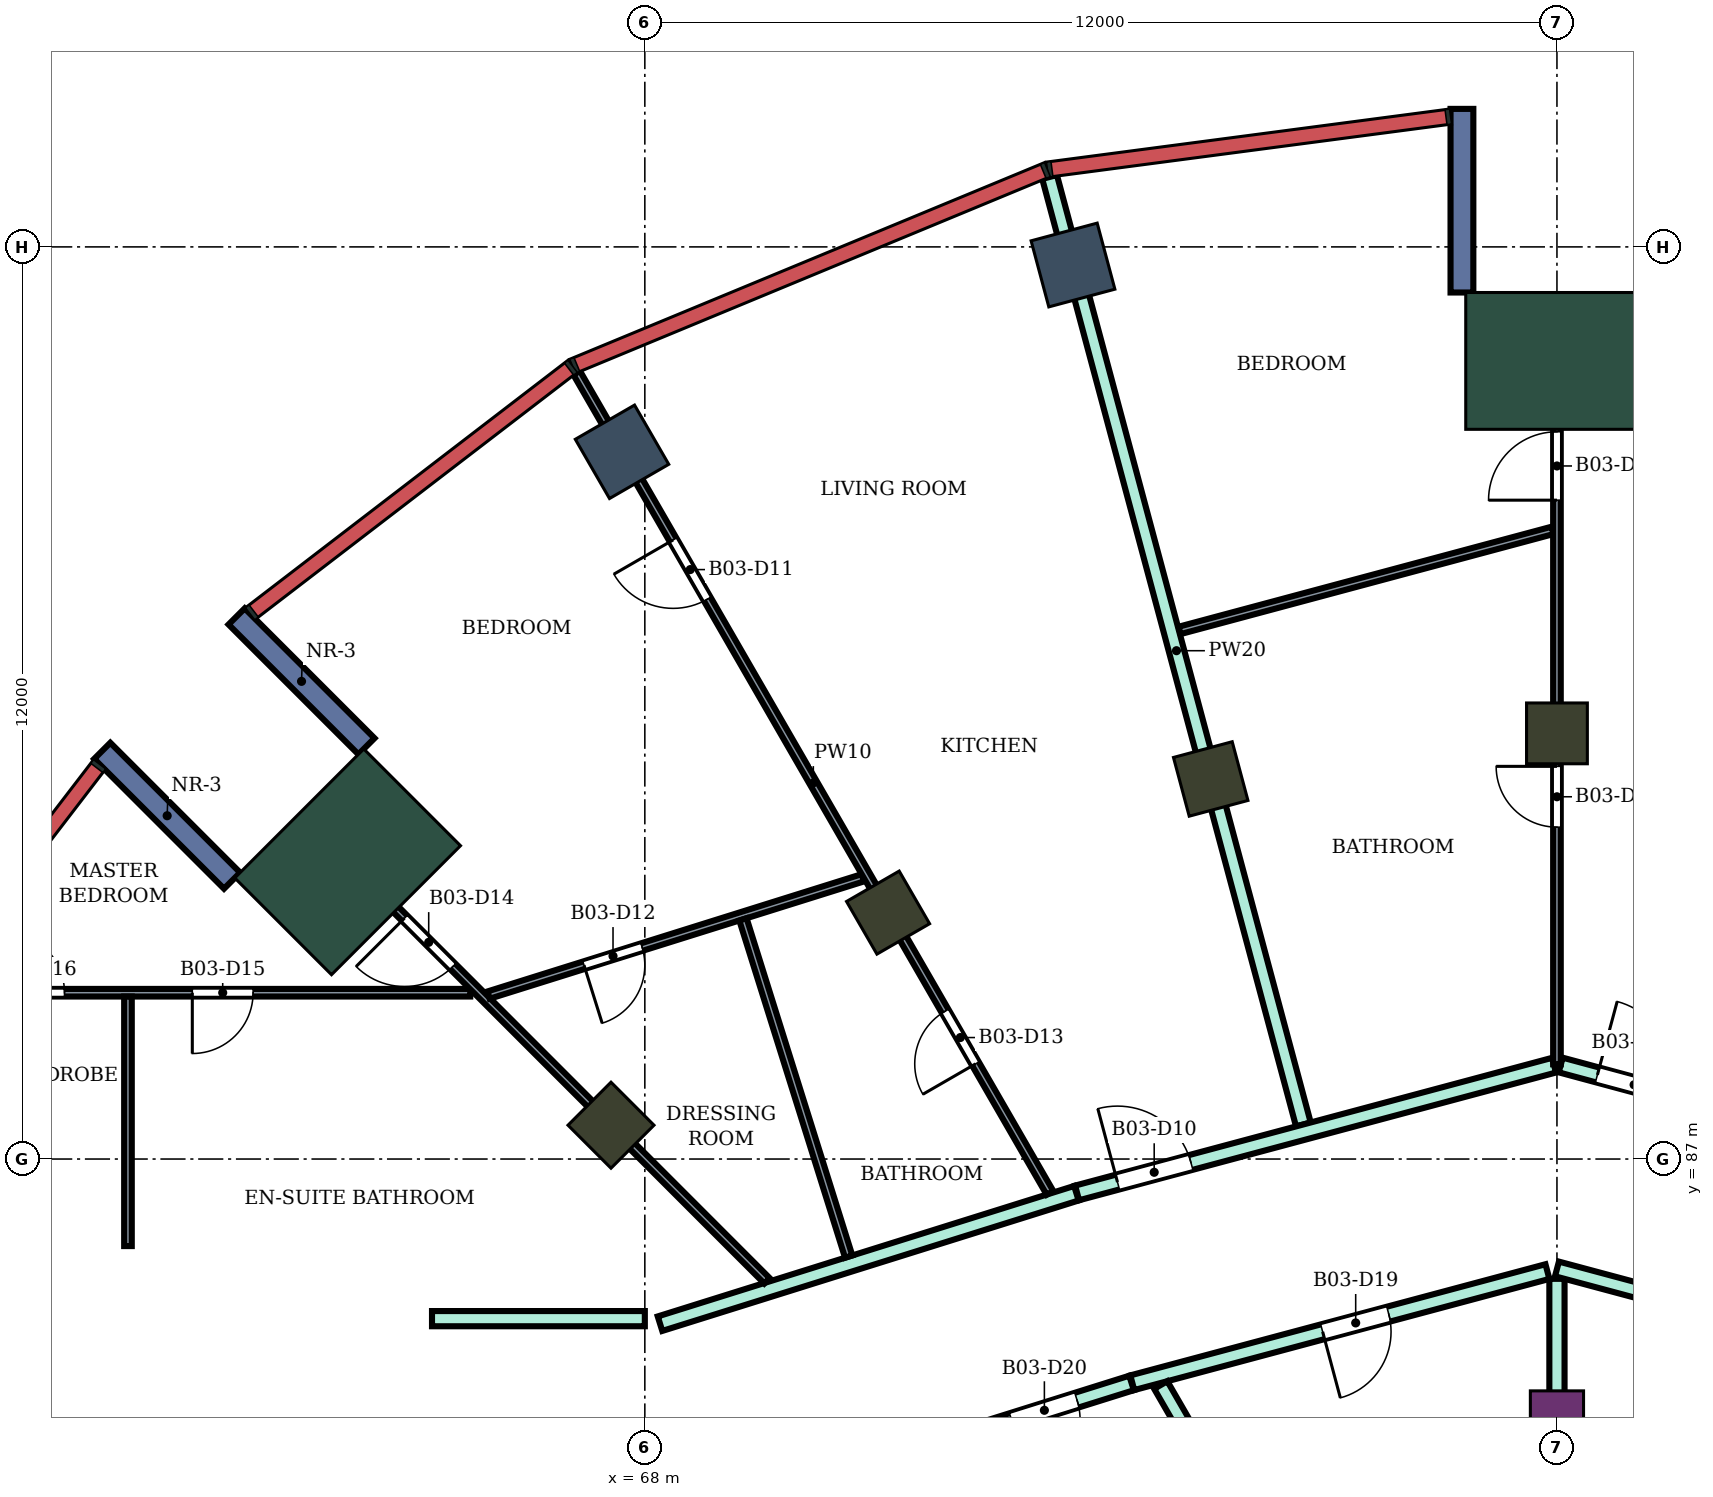
"""IFC4 building model, lengths in metres.
Left out: names, types, materials, properties, quantities, classifications, styles, units other than length and angle.
Written with IfcOpenShell. Run it as: python <this file> out.ifc"""

import sys

from ifc_helpers import new_model, si_unit, direction, frame, frame_2d, origin, origin_2d, place, context, subcontext, project, spatial, rectangle, extrude, element, fill, save


model = new_model("IFC4")
c1 = context("Model", 3, precision=1e-05, world=origin(), true_north=direction((0.0, 1.0)))
c2 = subcontext(c1, "Body", "Model", "MODEL_VIEW")
j1 = project(units=[si_unit("LENGTHUNIT", "METRE"), si_unit("PLANEANGLEUNIT", "RADIAN")], contexts=[c1])
p1 = place(None, origin())
s1 = spatial("IfcSite", under=j1, at=p1, CompositionType="ELEMENT")
p2 = place(p1, origin())
s2 = spatial("IfcBuilding", under=s1, at=p2, CompositionType="ELEMENT")
p3 = place(p2, frame((0.0, 0.0, 237.3)))
s3 = spatial("IfcBuildingStorey", under=s2, at=p3, CompositionType="ELEMENT", Elevation=237.3)
for number, where, z_axis, x_axis in (
    (1, (73.633, 98.762, 0.0), (0.0, 0.0, 1.0), (-0.259, 0.966, 0.0)),
    (2, (67.7, 96.304, 0.0), (0.0, 0.0, 1.0), (-0.5, 0.866, 0.0)),
):
    element("IfcColumn", number, at=place(p3, frame(where, z_axis=z_axis, x_axis=x_axis)), inside=s3, PredefinedType="COLUMN", context=c2, shape_type="SweptSolid", body=[
        extrude(rectangle(XDim=0.9, YDim=0.9, at=origin_2d()), origin(), (0.0, 0.0, 1.0), 4.2),
    ])
for number, where, z_axis, x_axis in (
    (3, (80.0, 92.6, 0.0), (0.0, 0.0, 1.0), (0.0, 1.0, 0.0)),
    (4, (75.445, 92.0, 0.0), (0.0, 0.0, 1.0), (-0.259, 0.966, 0.0)),
    (5, (71.2, 90.242, 0.0), (0.0, 0.0, 1.0), (-0.5, 0.866, 0.0)),
    (6, (67.555, 87.445, 0.0), (0.0, 0.0, 1.0), (-0.707, 0.707, 0.0)),
):
    element("IfcColumn", number, at=place(p3, frame(where, z_axis=z_axis, x_axis=x_axis)), inside=s3, PredefinedType="COLUMN", context=c2, shape_type="SweptSolid", body=[
        extrude(rectangle(XDim=0.8, YDim=0.8, at=origin_2d()), origin(), (0.0, 0.0, 1.0), 4.2),
    ])
p4 = place(p3, frame((80.0, 83.6, 0.0), z_axis=(0.0, 0.0, 1.0), x_axis=(0.0, 1.0, 0.0)))
e7 = element("IfcColumn", 7, at=p4, inside=s3, PredefinedType="COLUMN", context=c2, shape_type="SweptSolid", body=[
    extrude(rectangle(XDim=0.7, YDim=0.7, at=origin_2d()), origin(), (0.0, 0.0, 1.0), 4.2),
])
for number, where, z_axis, x_axis in (
    (8, (80.0, 97.5, 0.0), (0.0, 0.0, 1.0), (0.0, 1.0, 0.0)),
    (9, (64.09, 90.91, 0.0), (0.0, 0.0, 1.0), (-0.707, 0.707, 0.0)),
):
    element("IfcColumn", number, at=place(p3, frame(where, z_axis=z_axis, x_axis=x_axis)), inside=s3, PredefinedType="COLUMN", context=c2, shape_type="SweptSolid", body=[
        extrude(rectangle(XDim=1.8, YDim=2.4, at=origin_2d()), origin(), (0.0, 0.0, 1.0), 4.2),
    ])
for number, where, z_axis, x_axis in (
    (10, (78.75, 98.4, 0.0), (0.0, 0.0, 1.0), (0.0, 1.0, 0.0)),
    (11, (64.338, 92.43, 0.0), (0.0, 0.0, 1.0), (-0.707, 0.707, 0.0)),
    (12, (62.57, 90.662, 0.0), (0.0, 0.0, 1.0), (-0.707, 0.707, 0.0)),
):
    element("IfcWall", number, at=place(p3, frame(where, z_axis=z_axis, x_axis=x_axis)), inside=s3, PredefinedType="NOTDEFINED", context=c2, shape_type="SweptSolid", body=[
        extrude(rectangle(XDim=2.416, YDim=0.3, at=frame_2d((1.208, 0.0))), origin(), (0.0, 0.0, 1.0), 4.2),
    ])
p5 = place(p3, frame((65.2, 84.9, 0.0), z_axis=(0.0, 0.0, 1.0), x_axis=(1.0, 0.0, 0.0)))
e13 = element("IfcWall", 13, at=p5, inside=s3, PredefinedType="PARTITIONING", context=c2, shape_type="SweptSolid", body=[
    extrude(rectangle(XDim=2.8, YDim=0.2, at=frame_2d((1.4, 0.0))), origin(), (0.0, 0.0, 1.0), 3.75),
])
p6 = place(p3, frame((68.2, 84.834, 0.0), z_axis=(0.0, 0.0, 1.0), x_axis=(0.954272398161, 0.298938438661, 0.0)))
e14 = element("IfcWall", 14, at=p6, inside=s3, PredefinedType="PARTITIONING", context=c2, shape_type="SweptSolid", body=[
    extrude(rectangle(XDim=5.74, YDim=0.2, at=frame_2d((2.87, 0.0))), origin(), (0.0, 0.0, 1.0), 3.75),
])
p7 = place(p3, frame((72.1, 83.332, 0.0), z_axis=(0.0, 0.0, 1.0), x_axis=(0.954233106619, 0.299063836383, 0.0)))
e15 = element("IfcWall", 15, at=p7, inside=s3, PredefinedType="PARTITIONING", context=c2, shape_type="SweptSolid", body=[
    extrude(rectangle(XDim=2.414, YDim=0.2, at=frame_2d((1.207, 0.0))), origin(), (0.0, 0.0, 1.0), 3.75),
])
p8 = place(p7, frame((0.762, 0.0, 0.0)))
e16 = element("IfcOpeningElement", 16, at=p8, cuts=e15, PredefinedType="OPENING", context=c2, shape_type="SweptSolid", body=[
    extrude(rectangle(XDim=0.9, YDim=2.1, at=frame_2d((0.45, 1.05))), frame((0.0, 0.11, 0.0), z_axis=(0.0, -1.0, 0.0), x_axis=(1.0, 0.0, 0.0)), (0.0, 0.0, 1.0), 0.22),
])
p9 = place(p3, frame((73.325, 99.92, 0.0), z_axis=(0.0, 0.0, 1.0), x_axis=(0.258745857482, -0.965945433881, 0.0)))
e17 = element("IfcWall", 17, at=p9, inside=s3, PredefinedType="PARTITIONING", context=c2, shape_type="SweptSolid", body=[
    extrude(rectangle(XDim=12.904, YDim=0.2, at=frame_2d((6.452, 0.0))), origin(), (0.0, 0.0, 1.0), 3.75),
])
p10 = place(p3, frame((73.687, 86.554, 0.0), z_axis=(0.0, 0.0, 1.0), x_axis=(0.96595928904, 0.258694128106, 0.0)))
e18 = element("IfcWall", 18, at=p10, inside=s3, PredefinedType="PARTITIONING", context=c2, shape_type="SweptSolid", body=[
    extrude(rectangle(XDim=6.496, YDim=0.2, at=frame_2d((3.248, 0.0))), origin(), (0.0, 0.0, 1.0), 3.75),
])
p11 = place(p10, frame((0.55, 0.0, 0.0)))
e19 = element("IfcOpeningElement", 19, at=p11, cuts=e18, PredefinedType="OPENING", context=c2, shape_type="SweptSolid", body=[
    extrude(rectangle(XDim=1.0, YDim=2.1, at=frame_2d((0.5, 1.05))), frame((0.0, 0.11, 0.0), z_axis=(0.0, -1.0, 0.0), x_axis=(1.0, 0.0, 0.0)), (0.0, 0.0, 1.0), 0.22),
])
p12 = place(p3, frame((74.413, 84.057, 0.0), z_axis=(0.0, 0.0, 1.0), x_axis=(0.965972135939, 0.258646153246, 0.0)))
e20 = element("IfcWall", 20, at=p12, inside=s3, PredefinedType="PARTITIONING", context=c2, shape_type="SweptSolid", body=[
    extrude(rectangle(XDim=5.654, YDim=0.2, at=frame_2d((2.827, 0.0))), origin(), (0.0, 0.0, 1.0), 3.75),
])
p13 = place(p12, frame((2.593, 0.0, 0.0)))
e21 = element("IfcOpeningElement", 21, at=p13, cuts=e20, PredefinedType="OPENING", context=c2, shape_type="SweptSolid", body=[
    extrude(rectangle(XDim=0.9, YDim=2.1, at=frame_2d((0.45, 1.05))), frame((0.0, 0.11, 0.0), z_axis=(0.0, -1.0, 0.0), x_axis=(1.0, 0.0, 0.0)), (0.0, 0.0, 1.0), 0.22),
])
p14 = place(p3, frame((74.787, 84.027, 0.0), z_axis=(0.0, 0.0, 1.0), x_axis=(0.500079107518, -0.86597972622, 0.0)))
e22 = element("IfcWall", 22, at=p14, inside=s3, PredefinedType="PARTITIONING", context=c2, shape_type="SweptSolid", body=[
    extrude(rectangle(XDim=2.726, YDim=0.2, at=frame_2d((1.363, 0.0))), origin(), (0.0, 0.0, 1.0), 3.75),
])
p15 = place(p3, frame((80.0, 82.699, 0.0), z_axis=(0.0, 0.0, 1.0), x_axis=(0.0, 1.0, 0.0)))
e23 = element("IfcWall", 23, at=p15, inside=s3, PredefinedType="PARTITIONING", context=c2, shape_type="SweptSolid", body=[
    extrude(rectangle(XDim=2.725, YDim=0.2, at=frame_2d((1.363, 0.0))), origin(), (0.0, 0.0, 1.0), 3.75),
])
p16 = place(p3, frame((80.0, 85.554, 0.0), z_axis=(0.0, 0.0, 1.0), x_axis=(0.965928989968, -0.258807237802, 0.0)))
e24 = element("IfcWall", 24, at=p16, inside=s3, PredefinedType="PARTITIONING", context=c2, shape_type="SweptSolid", body=[
    extrude(rectangle(XDim=5.774, YDim=0.2, at=frame_2d((2.887, 0.0))), origin(), (0.0, 0.0, 1.0), 3.75),
])
p17 = place(p16, frame((2.292, 0.0, 0.0)))
e25 = element("IfcOpeningElement", 25, at=p17, cuts=e24, PredefinedType="OPENING", context=c2, shape_type="SweptSolid", body=[
    extrude(rectangle(XDim=0.9, YDim=2.1, at=frame_2d((0.45, 1.05))), frame((0.0, 0.11, 0.0), z_axis=(0.0, -1.0, 0.0), x_axis=(1.0, 0.0, 0.0)), (0.0, 0.0, 1.0), 0.22),
])
p18 = place(p3, frame((80.049, 88.237, 0.0), z_axis=(0.0, 0.0, 1.0), x_axis=(0.965582990495, -0.260095152718, 0.0)))
e26 = element("IfcWall", 26, at=p18, inside=s3, PredefinedType="PARTITIONING", context=c2, shape_type="SweptSolid", body=[
    extrude(rectangle(XDim=6.476, YDim=0.2, at=frame_2d((3.238, 0.0))), origin(), (0.0, 0.0, 1.0), 3.75),
])
p19 = place(p18, frame((0.5, 0.0, 0.0)))
e27 = element("IfcOpeningElement", 27, at=p19, cuts=e26, PredefinedType="OPENING", context=c2, shape_type="SweptSolid", body=[
    extrude(rectangle(XDim=1.0, YDim=2.1, at=frame_2d((0.5, 1.05))), frame((0.0, 0.11, 0.0), z_axis=(0.0, -1.0, 0.0), x_axis=(1.0, 0.0, 0.0)), (0.0, 0.0, 1.0), 0.22),
])
p20 = place(p3, frame((58.6, 89.188, 0.0), z_axis=(0.0, 0.0, 1.0), x_axis=(1.0, 0.0, 0.0)))
e28 = element("IfcWall", 28, at=p20, inside=s3, PredefinedType="PARTITIONING", context=c2, shape_type="SweptSolid", body=[
    extrude(rectangle(XDim=7.103, YDim=0.1, at=frame_2d((3.551, 0.0))), origin(), (0.0, 0.0, 1.0), 3.75),
])
p21 = place(p20, frame((3.447, 0.0, 0.0)))
e29 = element("IfcOpeningElement", 29, at=p21, cuts=e28, PredefinedType="OPENING", context=c2, shape_type="SweptSolid", body=[
    extrude(rectangle(XDim=0.8, YDim=2.1, at=frame_2d((0.4, 1.05))), frame((0.0, 0.06, 0.0), z_axis=(0.0, -1.0, 0.0), x_axis=(1.0, 0.0, 0.0)), (0.0, 0.0, 1.0), 0.12),
])
p22 = place(p20, frame((0.965, 0.0, 0.0)))
e30 = element("IfcOpeningElement", 30, at=p22, cuts=e28, PredefinedType="OPENING", context=c2, shape_type="SweptSolid", body=[
    extrude(rectangle(XDim=0.8, YDim=2.1, at=frame_2d((0.4, 1.05))), frame((0.0, 0.06, 0.0), z_axis=(0.0, -1.0, 0.0), x_axis=(1.0, 0.0, 0.0)), (0.0, 0.0, 1.0), 0.12),
])
p23 = place(p3, frame((61.2, 85.855, 0.0), z_axis=(0.0, 0.0, 1.0), x_axis=(0.0, 1.0, 0.0)))
e31 = element("IfcWall", 31, at=p23, inside=s3, PredefinedType="PARTITIONING", context=c2, shape_type="SweptSolid", body=[
    extrude(rectangle(XDim=3.283, YDim=0.1, at=frame_2d((1.642, 0.0))), origin(), (0.0, 0.0, 1.0), 3.75),
])
p24 = place(p3, frame((63.599, 91.409, 0.0), z_axis=(0.0, 0.0, 1.0), x_axis=(0.706948776529, -0.707264750546, 0.0)))
e32 = element("IfcWall", 32, at=p24, inside=s3, PredefinedType="PARTITIONING", context=c2, shape_type="SweptSolid", body=[
    extrude(rectangle(XDim=8.499, YDim=0.1, at=frame_2d((4.25, 0.0))), origin(), (0.0, 0.0, 1.0), 3.75),
])
p25 = place(p24, frame((1.753, 0.0, 0.0)))
e33 = element("IfcOpeningElement", 33, at=p25, cuts=e32, PredefinedType="OPENING", context=c2, shape_type="SweptSolid", body=[
    extrude(rectangle(XDim=0.9, YDim=2.1, at=frame_2d((0.45, 1.05))), frame((0.0, 0.06, 0.0), z_axis=(0.0, -1.0, 0.0), x_axis=(1.0, 0.0, 0.0)), (0.0, 0.0, 1.0), 0.12),
])
p26 = place(p3, frame((65.944, 89.157, 0.0), z_axis=(0.0, 0.0, 1.0), x_axis=(0.954248987961, 0.299013158531, 0.0)))
e34 = element("IfcWall", 34, at=p26, inside=s3, PredefinedType="PARTITIONING", context=c2, shape_type="SweptSolid", body=[
    extrude(rectangle(XDim=5.159, YDim=0.1, at=frame_2d((2.58, 0.0))), origin(), (0.0, 0.0, 1.0), 3.75),
])
p27 = place(p26, frame((1.316, 0.0, 0.0)))
e35 = element("IfcOpeningElement", 35, at=p27, cuts=e34, PredefinedType="OPENING", context=c2, shape_type="SweptSolid", body=[
    extrude(rectangle(XDim=0.8, YDim=2.1, at=frame_2d((0.4, 1.05))), frame((0.0, 0.06, 0.0), z_axis=(0.0, -1.0, 0.0), x_axis=(1.0, 0.0, 0.0)), (0.0, 0.0, 1.0), 0.12),
])
p28 = place(p3, frame((67.104, 97.343, 0.0), z_axis=(0.0, 0.0, 1.0), x_axis=(0.499891560959, -0.866088002043, 0.0)))
e36 = element("IfcWall", 36, at=p28, inside=s3, PredefinedType="PARTITIONING", context=c2, shape_type="SweptSolid", body=[
    extrude(rectangle(XDim=12.456, YDim=0.1, at=frame_2d((6.228, 0.0))), origin(), (0.0, 0.0, 1.0), 3.75),
])
p29 = place(p28, frame((2.538, 0.0, 0.0)))
e37 = element("IfcOpeningElement", 37, at=p29, cuts=e36, PredefinedType="OPENING", context=c2, shape_type="SweptSolid", body=[
    extrude(rectangle(XDim=0.9, YDim=2.1, at=frame_2d((0.45, 1.05))), frame((0.0, 0.06, 0.0), z_axis=(0.0, -1.0, 0.0), x_axis=(1.0, 0.0, 0.0)), (0.0, 0.0, 1.0), 0.12),
])
p30 = place(p28, frame((9.697, 0.0, 0.0)))
e38 = element("IfcOpeningElement", 38, at=p30, cuts=e36, PredefinedType="OPENING", context=c2, shape_type="SweptSolid", body=[
    extrude(rectangle(XDim=0.8, YDim=2.1, at=frame_2d((0.4, 1.05))), frame((0.0, 0.06, 0.0), z_axis=(0.0, -1.0, 0.0), x_axis=(1.0, 0.0, 0.0)), (0.0, 0.0, 1.0), 0.12),
])
p31 = place(p3, frame((69.291, 90.153, 0.0), z_axis=(0.0, 0.0, 1.0), x_axis=(0.299165743488, -0.954201162189, 0.0)))
e39 = element("IfcWall", 39, at=p31, inside=s3, PredefinedType="PARTITIONING", context=c2, shape_type="SweptSolid", body=[
    extrude(rectangle(XDim=4.65, YDim=0.1, at=frame_2d((2.325, 0.0))), origin(), (0.0, 0.0, 1.0), 3.75),
])
p32 = place(p3, frame((75.035, 93.955, 0.0), z_axis=(0.0, 0.0, 1.0), x_axis=(0.965868648254, 0.259032342228, 0.0)))
e40 = element("IfcWall", 40, at=p32, inside=s3, PredefinedType="PARTITIONING", context=c2, shape_type="SweptSolid", body=[
    extrude(rectangle(XDim=5.08, YDim=0.1, at=frame_2d((2.54, 0.0))), origin(), (0.0, 0.0, 1.0), 3.75),
])
p33 = place(p3, frame((80.0, 88.246, 0.0), z_axis=(0.0, 0.0, 1.0), x_axis=(0.0, 1.0, 0.0)))
e41 = element("IfcWall", 41, at=p33, inside=s3, PredefinedType="PARTITIONING", context=c2, shape_type="SweptSolid", body=[
    extrude(rectangle(XDim=9.954, YDim=0.1, at=frame_2d((4.977, 0.0))), origin(), (0.0, 0.0, 1.0), 3.75),
])
p34 = place(p33, frame((7.422, 0.0, 0.0)))
e42 = element("IfcOpeningElement", 42, at=p34, cuts=e41, PredefinedType="OPENING", context=c2, shape_type="SweptSolid", body=[
    extrude(rectangle(XDim=0.9, YDim=2.1, at=frame_2d((0.45, 1.05))), frame((0.0, 0.06, 0.0), z_axis=(0.0, -1.0, 0.0), x_axis=(1.0, 0.0, 0.0)), (0.0, 0.0, 1.0), 0.12),
])
p35 = place(p33, frame((3.12, 0.0, 0.0)))
e43 = element("IfcOpeningElement", 43, at=p35, cuts=e41, PredefinedType="OPENING", context=c2, shape_type="SweptSolid", body=[
    extrude(rectangle(XDim=0.8, YDim=2.1, at=frame_2d((0.4, 1.05))), frame((0.0, 0.06, 0.0), z_axis=(0.0, -1.0, 0.0), x_axis=(1.0, 0.0, 0.0)), (0.0, 0.0, 1.0), 0.12),
])
p36 = place(p19, origin())
e44 = element("IfcDoor", 44, at=p36, inside=s3, OperationType="SINGLE_SWING_LEFT", PredefinedType="DOOR", context=c2, shape_type="SweptSolid", body=[
    extrude(rectangle(XDim=1.0, YDim=2.1, at=frame_2d((0.5, 1.05))), frame((0.0, 0.025, 0.0), z_axis=(0.0, -1.0, 0.0), x_axis=(1.0, 0.0, 0.0)), (0.0, 0.0, 1.0), 0.05),
])
fill(e27, e44)
p37 = place(p34, origin())
e45 = element("IfcDoor", 45, at=p37, inside=s3, OperationType="SINGLE_SWING_LEFT", PredefinedType="DOOR", context=c2, shape_type="SweptSolid", body=[
    extrude(rectangle(XDim=0.9, YDim=2.1, at=frame_2d((0.45, 1.05))), frame((0.0, 0.025, 0.0), z_axis=(0.0, -1.0, 0.0), x_axis=(1.0, 0.0, 0.0)), (0.0, 0.0, 1.0), 0.05),
])
fill(e42, e45)
p38 = place(p35, origin())
e46 = element("IfcDoor", 46, at=p38, inside=s3, OperationType="SINGLE_SWING_RIGHT", PredefinedType="DOOR", context=c2, shape_type="SweptSolid", body=[
    extrude(rectangle(XDim=0.8, YDim=2.1, at=frame_2d((0.4, 1.05))), frame((0.0, 0.025, 0.0), z_axis=(0.0, -1.0, 0.0), x_axis=(1.0, 0.0, 0.0)), (0.0, 0.0, 1.0), 0.05),
])
fill(e43, e46)
p39 = place(p11, origin())
e47 = element("IfcDoor", 47, at=p39, inside=s3, OperationType="SINGLE_SWING_LEFT", PredefinedType="DOOR", context=c2, shape_type="SweptSolid", body=[
    extrude(rectangle(XDim=1.0, YDim=2.1, at=frame_2d((0.5, 1.05))), frame((0.0, 0.025, 0.0), z_axis=(0.0, -1.0, 0.0), x_axis=(1.0, 0.0, 0.0)), (0.0, 0.0, 1.0), 0.05),
])
fill(e19, e47)
p40 = place(p29, frame((0.9, 0.0, 0.0), z_axis=(0.0, 0.0, 1.0), x_axis=(-1.0, 0.0, 0.0)))
e48 = element("IfcDoor", 48, at=p40, inside=s3, OperationType="SINGLE_SWING_RIGHT", PredefinedType="DOOR", context=c2, shape_type="SweptSolid", body=[
    extrude(rectangle(XDim=0.9, YDim=2.1, at=frame_2d((0.45, 1.05))), frame((0.0, 0.025, 0.0), z_axis=(0.0, -1.0, 0.0), x_axis=(1.0, 0.0, 0.0)), (0.0, 0.0, 1.0), 0.05),
])
fill(e37, e48)
p41 = place(p27, frame((0.8, 0.0, 0.0), z_axis=(0.0, 0.0, 1.0), x_axis=(-1.0, 0.0, 0.0)))
e49 = element("IfcDoor", 49, at=p41, inside=s3, OperationType="SINGLE_SWING_RIGHT", PredefinedType="DOOR", context=c2, shape_type="SweptSolid", body=[
    extrude(rectangle(XDim=0.8, YDim=2.1, at=frame_2d((0.4, 1.05))), frame((0.0, 0.025, 0.0), z_axis=(0.0, -1.0, 0.0), x_axis=(1.0, 0.0, 0.0)), (0.0, 0.0, 1.0), 0.05),
])
fill(e35, e49)
p42 = place(p30, frame((0.8, 0.0, 0.0), z_axis=(0.0, 0.0, 1.0), x_axis=(-1.0, 0.0, 0.0)))
e50 = element("IfcDoor", 50, at=p42, inside=s3, OperationType="SINGLE_SWING_LEFT", PredefinedType="DOOR", context=c2, shape_type="SweptSolid", body=[
    extrude(rectangle(XDim=0.8, YDim=2.1, at=frame_2d((0.4, 1.05))), frame((0.0, 0.025, 0.0), z_axis=(0.0, -1.0, 0.0), x_axis=(1.0, 0.0, 0.0)), (0.0, 0.0, 1.0), 0.05),
])
fill(e38, e50)
p43 = place(p25, frame((0.9, 0.0, 0.0), z_axis=(0.0, 0.0, 1.0), x_axis=(-1.0, 0.0, 0.0)))
e51 = element("IfcDoor", 51, at=p43, inside=s3, OperationType="SINGLE_SWING_RIGHT", PredefinedType="DOOR", context=c2, shape_type="SweptSolid", body=[
    extrude(rectangle(XDim=0.9, YDim=2.1, at=frame_2d((0.45, 1.05))), frame((0.0, 0.025, 0.0), z_axis=(0.0, -1.0, 0.0), x_axis=(1.0, 0.0, 0.0)), (0.0, 0.0, 1.0), 0.05),
])
fill(e33, e51)
p44 = place(p21, frame((0.8, 0.0, 0.0), z_axis=(0.0, 0.0, 1.0), x_axis=(-1.0, 0.0, 0.0)))
e52 = element("IfcDoor", 52, at=p44, inside=s3, OperationType="SINGLE_SWING_RIGHT", PredefinedType="DOOR", context=c2, shape_type="SweptSolid", body=[
    extrude(rectangle(XDim=0.8, YDim=2.1, at=frame_2d((0.4, 1.05))), frame((0.0, 0.025, 0.0), z_axis=(0.0, -1.0, 0.0), x_axis=(1.0, 0.0, 0.0)), (0.0, 0.0, 1.0), 0.05),
])
fill(e29, e52)
p45 = place(p22, origin())
e53 = element("IfcDoor", 53, at=p45, inside=s3, OperationType="SINGLE_SWING_LEFT", PredefinedType="DOOR", context=c2, shape_type="SweptSolid", body=[
    extrude(rectangle(XDim=0.8, YDim=2.1, at=frame_2d((0.4, 1.05))), frame((0.0, 0.025, 0.0), z_axis=(0.0, -1.0, 0.0), x_axis=(1.0, 0.0, 0.0)), (0.0, 0.0, 1.0), 0.05),
])
fill(e30, e53)
p46 = place(p13, frame((0.9, 0.0, 0.0), z_axis=(0.0, 0.0, 1.0), x_axis=(-1.0, 0.0, 0.0)))
e54 = element("IfcDoor", 54, at=p46, inside=s3, OperationType="SINGLE_SWING_RIGHT", PredefinedType="DOOR", context=c2, shape_type="SweptSolid", body=[
    extrude(rectangle(XDim=0.9, YDim=2.1, at=frame_2d((0.45, 1.05))), frame((0.0, 0.025, 0.0), z_axis=(0.0, -1.0, 0.0), x_axis=(1.0, 0.0, 0.0)), (0.0, 0.0, 1.0), 0.05),
])
fill(e21, e54)
p47 = place(p8, frame((0.9, 0.0, 0.0), z_axis=(0.0, 0.0, 1.0), x_axis=(-1.0, 0.0, 0.0)))
e55 = element("IfcDoor", 55, at=p47, inside=s3, OperationType="SINGLE_SWING_RIGHT", PredefinedType="DOOR", context=c2, shape_type="SweptSolid", body=[
    extrude(rectangle(XDim=0.9, YDim=2.1, at=frame_2d((0.45, 1.05))), frame((0.0, 0.025, 0.0), z_axis=(0.0, -1.0, 0.0), x_axis=(1.0, 0.0, 0.0)), (0.0, 0.0, 1.0), 0.05),
])
fill(e16, e55)
save(model, sys.argv[1])
